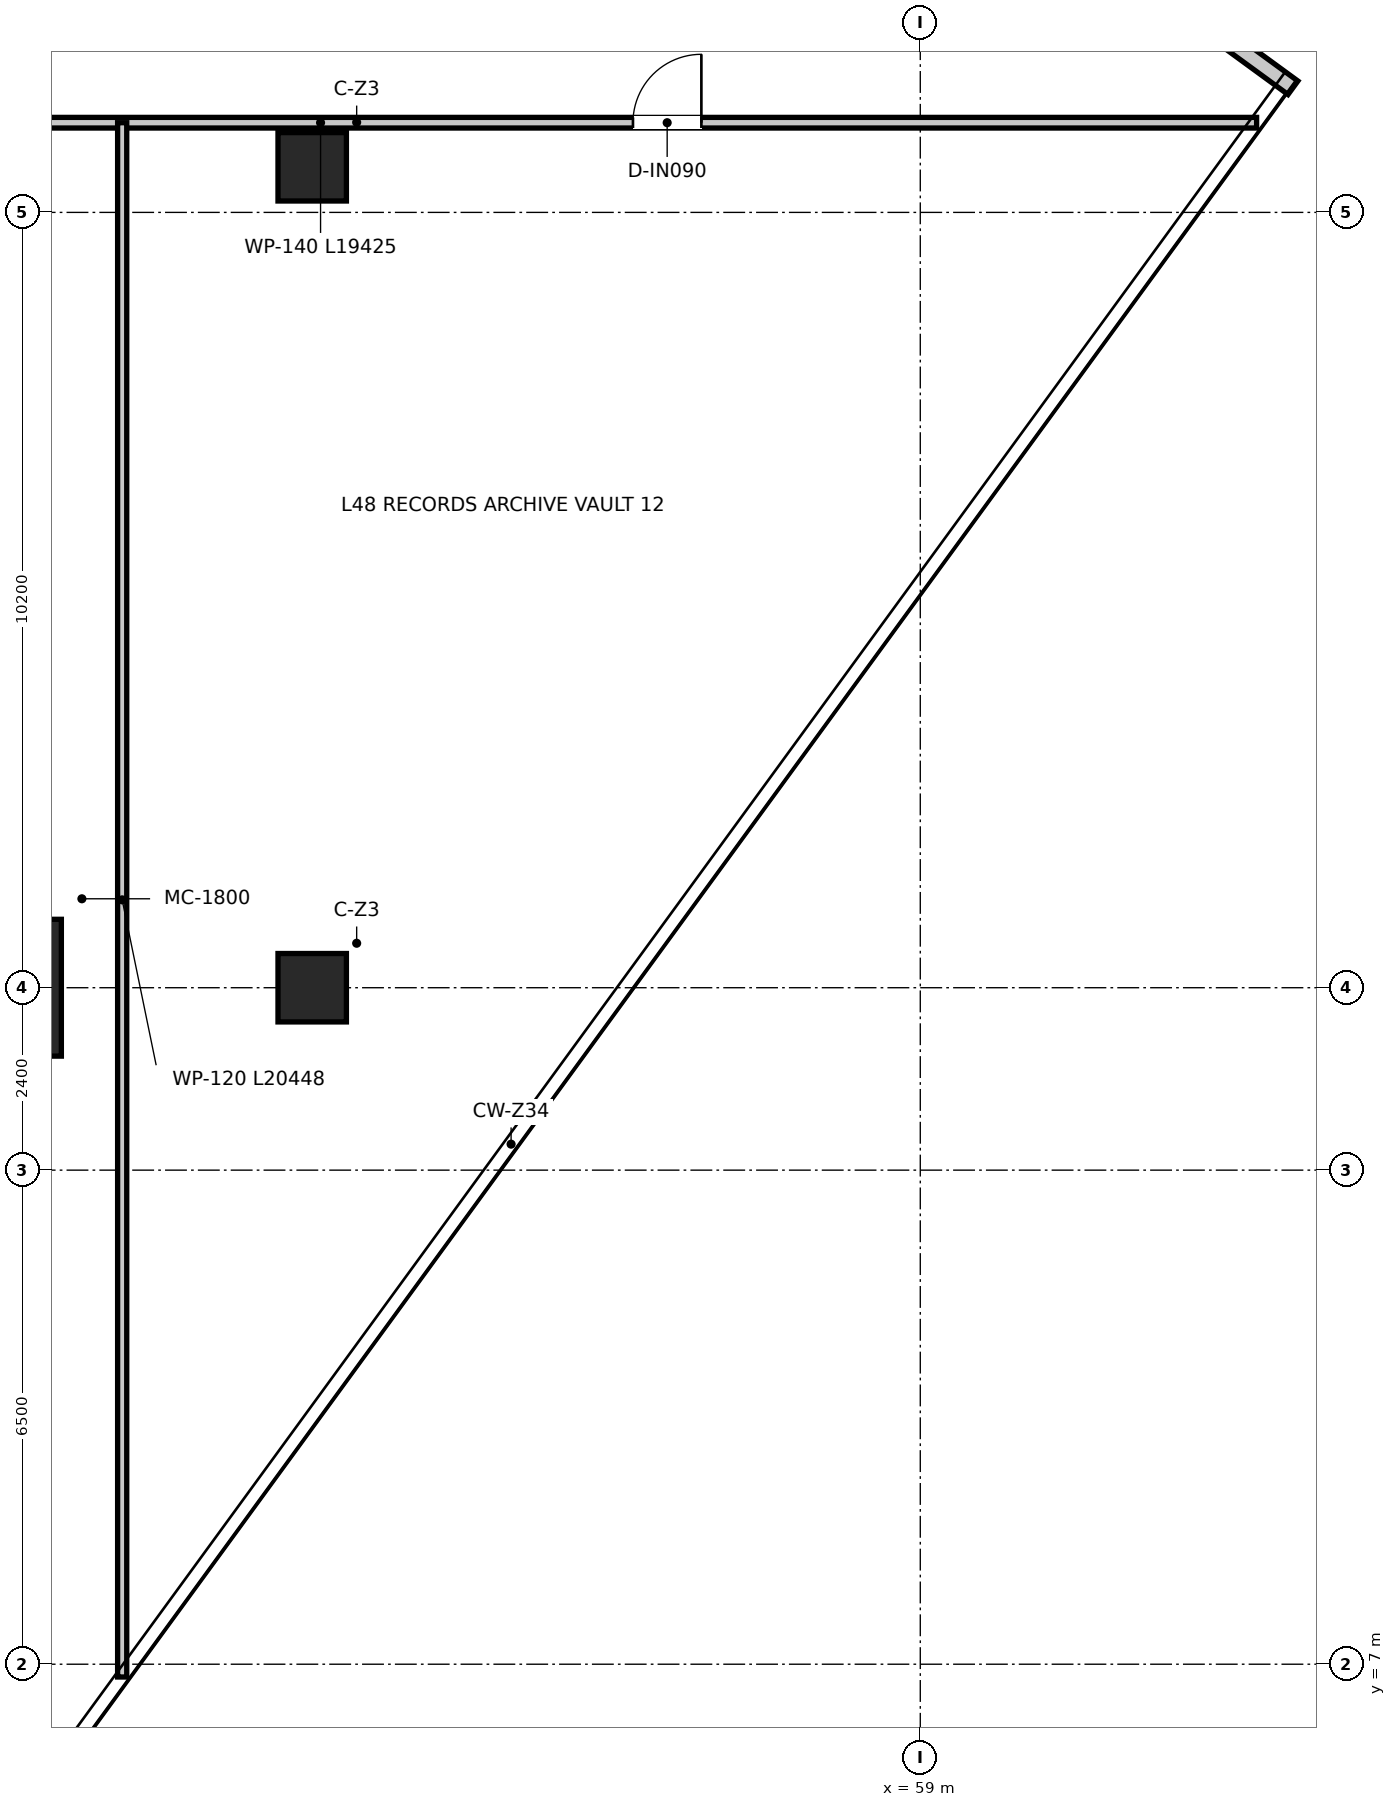
"""IFC4 building model, lengths in metres.
Left out: names, types, materials, properties, quantities, classifications, styles, units other than length and angle.
Written with IfcOpenShell. Run it as: python <this file> out.ifc"""

import sys

from ifc_helpers import new_model, si_unit, direction, frame, frame_2d, origin, origin_2d, place, context, subcontext, project, spatial, rectangle, extrude, source, transform, mapped, element, fill, save


model = new_model("IFC4")
c1 = context("Model", 3, precision=1e-05, world=origin(), true_north=direction((0.0, 1.0)))
c2 = subcontext(c1, "Body", "Model", "MODEL_VIEW")
j1 = project(units=[si_unit("LENGTHUNIT", "METRE"), si_unit("PLANEANGLEUNIT", "RADIAN")], contexts=[c1])
p1 = place(None, origin())
s1 = spatial("IfcSite", under=j1, at=p1, CompositionType="ELEMENT")
p2 = place(p1, origin())
s2 = spatial("IfcBuilding", under=s1, at=p2, CompositionType="ELEMENT")
p3 = place(p2, frame((0.0, 0.0, 197.55)))
s3 = spatial("IfcBuildingStorey", under=s2, at=p3, CompositionType="ELEMENT", Elevation=197.55)
m1 = source(origin(), c2, "Body", "SweptSolid", [
    extrude(rectangle(XDim=1.8, YDim=1.8, at=origin_2d()), origin(), (0.0, 0.0, 1.0), 3.95),
])
p4 = place(p3, frame((46.8, 15.9, 0.0), z_axis=(0.0, 0.0, 1.0), x_axis=(1.0, 0.0, 0.0)))
e1 = element("IfcColumn", 1, at=p4, inside=s3, PredefinedType="USERDEFINED", context=c2, shape_type="MappedRepresentation", body=[
    mapped(m1, transform((0.0, 0.0, 0.0), x_axis=(1.0, 0.0, 0.0), y_axis=(0.0, 1.0, 0.0), z_axis=(0.0, 0.0, 1.0), scale=1.0)),
])
m2 = source(origin(), c2, "Body", "SweptSolid", [
    extrude(rectangle(XDim=0.9, YDim=0.9, at=origin_2d()), origin(), (0.0, 0.0, 1.0), 3.95),
])
for number, where, z_axis, x_axis in (
    (2, (51.0, 26.7, 0.0), (0.0, 0.0, 1.0), (1.0, 0.0, 0.0)),
    (3, (51.0, 15.9, 0.0), (0.0, 0.0, 1.0), (1.0, 0.0, 0.0)),
):
    element("IfcColumn", number, at=place(p3, frame(where, z_axis=z_axis, x_axis=x_axis)), inside=s3, PredefinedType="COLUMN", context=c2, shape_type="MappedRepresentation", body=[
        mapped(m2, transform((0.0, 0.0, 0.0), x_axis=(1.0, 0.0, 0.0), y_axis=(0.0, 1.0, 0.0), z_axis=(0.0, 0.0, 1.0), scale=1.0)),
    ])
p5 = place(p3, frame((63.903, 27.74, 0.0), z_axis=(0.0, 0.0, 1.0), x_axis=(-0.807718106916, 0.58956887618, 0.0)))
e4 = element("IfcWall", 4, at=p5, inside=s3, PredefinedType="ELEMENTEDWALL", context=c2, shape_type="SweptSolid", body=[
    extrude(rectangle(XDim=4.745, YDim=0.22, at=frame_2d((2.373, 0.0))), origin(), (0.0, 0.0, 1.0), 3.59),
])
p6 = place(p3, frame((44.0, 27.28, 0.0), z_axis=(0.0, 0.0, 1.0), x_axis=(1.0, 0.0, 0.0)))
e5 = element("IfcWall", 5, at=p6, inside=s3, PredefinedType="PARTITIONING", context=c2, shape_type="SweptSolid", body=[
    extrude(rectangle(XDim=19.425, YDim=0.14, at=frame_2d((9.712, 0.0))), origin(), (0.0, 0.0, 1.0), 2.95),
])
p7 = place(p6, frame((2.1, 0.0, 0.0)))
e6 = element("IfcOpeningElement", 6, at=p7, cuts=e5, PredefinedType="OPENING", context=c2, shape_type="SweptSolid", body=[
    extrude(rectangle(XDim=0.9, YDim=2.1, at=frame_2d((0.45, 1.05))), frame((0.0, 0.08, 0.0), z_axis=(0.0, -1.0, 0.0), x_axis=(1.0, 0.0, 0.0)), (0.0, 0.0, 1.0), 0.16),
])
p8 = place(p6, frame((11.22, 0.0, 0.0)))
e7 = element("IfcOpeningElement", 7, at=p8, cuts=e5, PredefinedType="OPENING", context=c2, shape_type="SweptSolid", body=[
    extrude(rectangle(XDim=0.9, YDim=2.1, at=frame_2d((0.45, 1.05))), frame((0.0, 0.08, 0.0), z_axis=(0.0, -1.0, 0.0), x_axis=(1.0, 0.0, 0.0)), (0.0, 0.0, 1.0), 0.16),
])
p9 = place(p3, frame((48.5, 6.832, 0.0), z_axis=(0.0, 0.0, 1.0), x_axis=(0.0, 1.0, 0.0)))
e8 = element("IfcWall", 8, at=p9, inside=s3, PredefinedType="PARTITIONING", context=c2, shape_type="SweptSolid", body=[
    extrude(rectangle(XDim=20.448, YDim=0.12, at=frame_2d((10.224, 0.0))), origin(), (0.0, 0.0, 1.0), 3.0),
])
p10 = place(p8, origin())
e9 = element("IfcDoor", 9, at=p10, inside=s3, OperationType="SINGLE_SWING_RIGHT", PredefinedType="DOOR", context=c2, shape_type="SweptSolid", body=[
    extrude(rectangle(XDim=0.9, YDim=2.1, at=frame_2d((0.45, 1.05))), frame((0.0, 0.025, 0.0), z_axis=(0.0, -1.0, 0.0), x_axis=(1.0, 0.0, 0.0)), (0.0, 0.0, 1.0), 0.05),
])
fill(e7, e9)
save(model, sys.argv[1])
